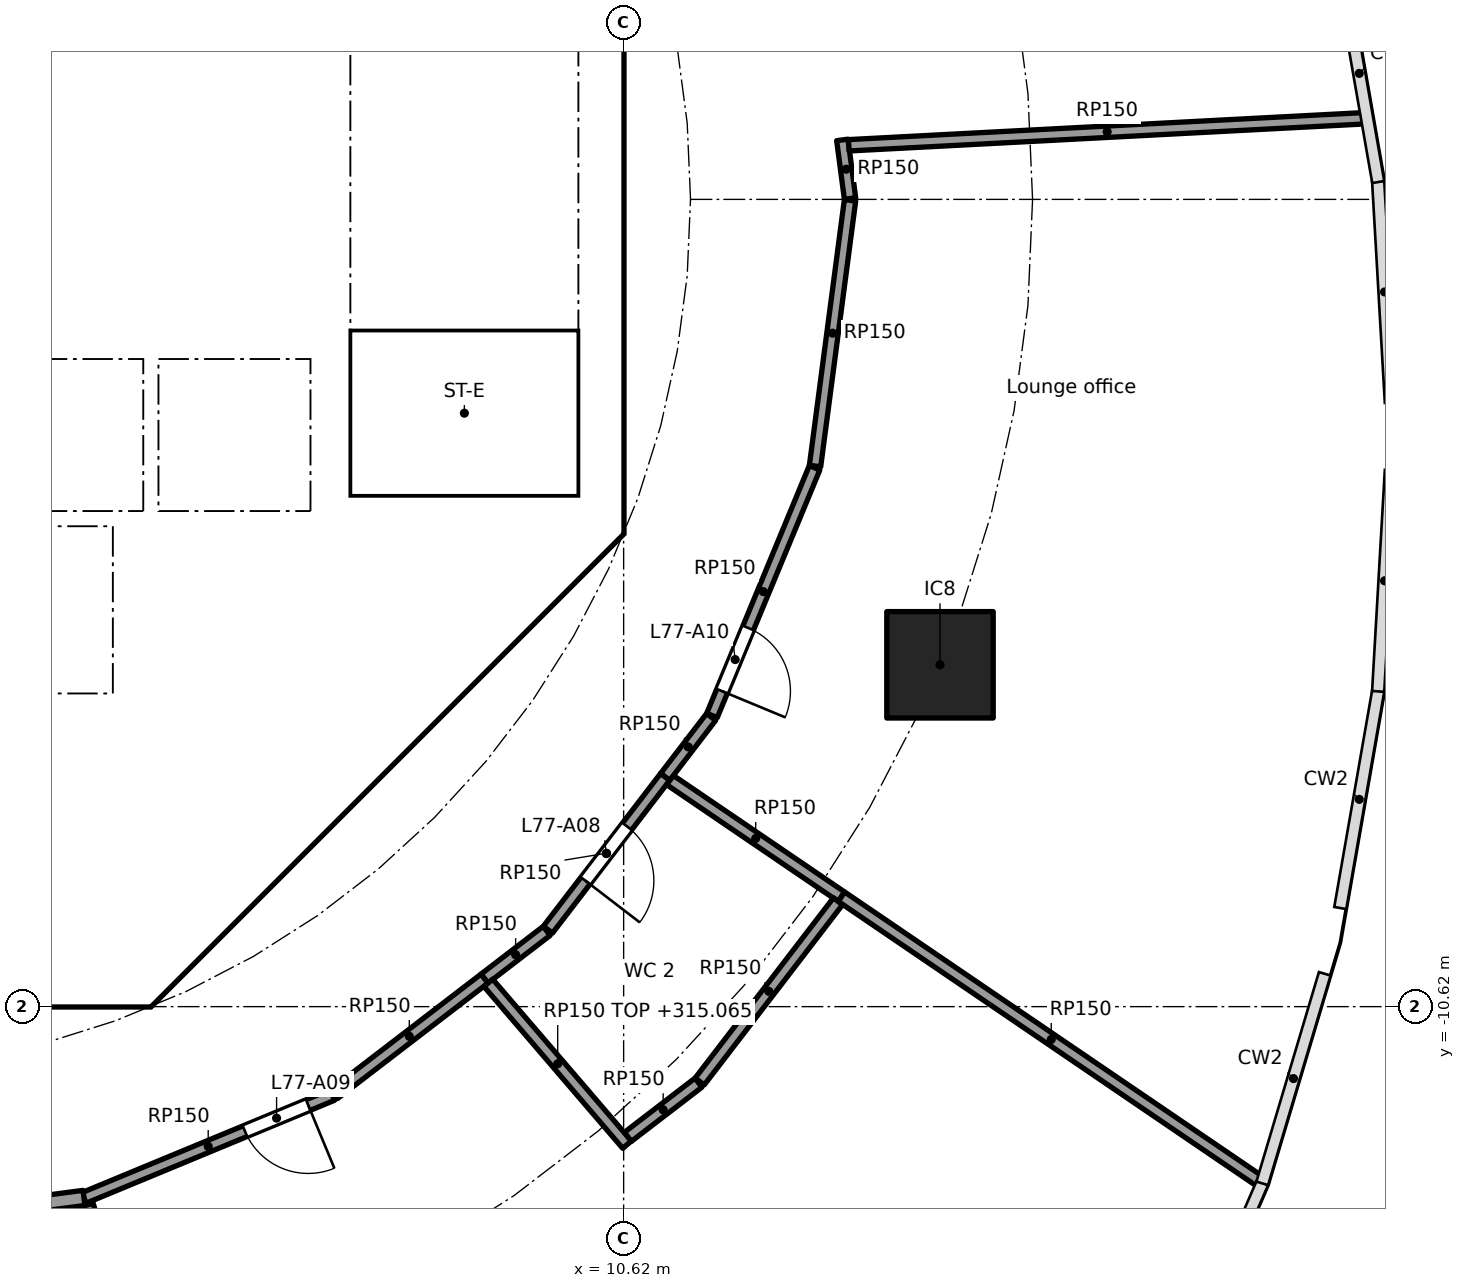
"""IFC4 building model, lengths in metres.
Left out: names, types, materials, properties, quantities, classifications, styles, units other than length and angle.
Written with IfcOpenShell. Run it as: python <this file> out.ifc"""

import sys

from ifc_helpers import new_model, si_unit, direction, frame, frame_2d, origin, origin_2d, place, context, subcontext, project, spatial, polyline, rectangle, outline, extrude, element, fill, save


model = new_model("IFC4")
c1 = context("Model", 3, precision=1e-05, world=origin(), true_north=direction((0.0, 1.0)))
c2 = subcontext(c1, "Body", "Model", "MODEL_VIEW")
j1 = project(units=[si_unit("LENGTHUNIT", "METRE"), si_unit("PLANEANGLEUNIT", "RADIAN")], contexts=[c1])
p1 = place(None, origin())
s1 = spatial("IfcSite", under=j1, at=p1, CompositionType="ELEMENT")
p2 = place(p1, origin())
s2 = spatial("IfcBuilding", under=s1, at=p2, CompositionType="ELEMENT")
p3 = place(p2, frame((0.0, 0.0, 310.3)))
s3 = spatial("IfcBuildingStorey", under=s2, at=p3, CompositionType="ELEMENT", Elevation=310.3)
p4 = place(p3, frame((14.782, -6.123, 0.0), z_axis=(0.0, 0.0, 1.0), x_axis=(1.0, 0.0, 0.0)))
e1 = element("IfcColumn", 1, at=p4, inside=s3, PredefinedType="COLUMN", context=c2, shape_type="SweptSolid", body=[
    extrude(rectangle(XDim=1.4, YDim=1.4, at=origin_2d()), origin(), (0.0, 0.0, 1.0), 5.6),
])
p5 = place(p3, frame((4.613, -9.988, 0.0), z_axis=(0.0, 0.0, 1.0), x_axis=(0.707106781187, 0.707106781187, 0.0)))
e2 = element("IfcWall", 2, at=p5, inside=s3, PredefinedType="SHEAR", context=c2, shape_type="SweptSolid", body=[
    extrude(rectangle(XDim=7.602, YDim=0.6, at=frame_2d((3.801, 0.0))), origin(), (0.0, 0.0, 1.0), 5.3),
])
p6 = place(p5, frame((3.201, 0.0, 0.0)))
e3 = element("IfcOpeningElement", 3, at=p6, cuts=e2, PredefinedType="OPENING", context=c2, shape_type="SweptSolid", body=[
    extrude(rectangle(XDim=1.2, YDim=2.1, at=frame_2d((0.6, 1.05))), frame((0.0, 0.31, 0.0), z_axis=(0.0, -1.0, 0.0), x_axis=(1.0, 0.0, 0.0)), (0.0, 0.0, 1.0), 0.62),
])
p7 = place(p3, frame((-6.7, 2.0, 0.0), z_axis=(0.0, 0.0, 1.0), x_axis=(1.0, 0.0, 0.0)))
e4 = element("IfcWall", 4, at=p7, inside=s3, PredefinedType="SOLIDWALL", context=c2, shape_type="SweptSolid", body=[
    extrude(rectangle(XDim=13.4, YDim=0.2, at=frame_2d((6.7, 0.0))), origin(), (0.0, 0.0, 1.0), 5.3),
])
p8 = place(p7, frame((11.65, 0.0, 0.0)))
e5 = element("IfcOpeningElement", 5, at=p8, cuts=e4, PredefinedType="OPENING", context=c2, shape_type="SweptSolid", body=[
    extrude(rectangle(XDim=1.1, YDim=2.1, at=frame_2d((0.55, 1.05))), frame((0.0, 0.11, 0.0), z_axis=(0.0, -1.0, 0.0), x_axis=(1.0, 0.0, 0.0)), (0.0, 0.0, 1.0), 0.22),
])
p9 = place(p7, frame((0.75, 0.0, 0.0)))
e6 = element("IfcOpeningElement", 6, at=p9, cuts=e4, PredefinedType="OPENING", context=c2, shape_type="SweptSolid", body=[
    extrude(rectangle(XDim=0.9, YDim=2.1, at=frame_2d((0.45, 1.05))), frame((0.0, 0.11, 0.0), z_axis=(0.0, -1.0, 0.0), x_axis=(1.0, 0.0, 0.0)), (0.0, 0.0, 1.0), 0.22),
])
p10 = place(p7, frame((4.05, 0.0, 0.0)))
e7 = element("IfcOpeningElement", 7, at=p10, cuts=e4, PredefinedType="OPENING", context=c2, shape_type="SweptSolid", body=[
    extrude(rectangle(XDim=0.9, YDim=2.1, at=frame_2d((0.45, 1.05))), frame((0.0, 0.11, 0.0), z_axis=(0.0, -1.0, 0.0), x_axis=(1.0, 0.0, 0.0)), (0.0, 0.0, 1.0), 0.22),
])
p11 = place(p7, frame((7.35, 0.0, 0.0)))
e8 = element("IfcOpeningElement", 8, at=p11, cuts=e4, PredefinedType="OPENING", context=c2, shape_type="SweptSolid", body=[
    extrude(rectangle(XDim=0.9, YDim=2.1, at=frame_2d((0.45, 1.05))), frame((0.0, 0.11, 0.0), z_axis=(0.0, -1.0, 0.0), x_axis=(1.0, 0.0, 0.0)), (0.0, 0.0, 1.0), 0.22),
])
p12 = place(p7, frame((9.55, 0.0, 0.0)))
e9 = element("IfcOpeningElement", 9, at=p12, cuts=e4, PredefinedType="OPENING", context=c2, shape_type="SweptSolid", body=[
    extrude(rectangle(XDim=0.9, YDim=2.1, at=frame_2d((0.45, 1.05))), frame((0.0, 0.11, 0.0), z_axis=(0.0, -1.0, 0.0), x_axis=(1.0, 0.0, 0.0)), (0.0, 0.0, 1.0), 0.22),
])
p13 = place(p3, frame((4.0, -10.025, 0.0), z_axis=(0.0, 0.0, 1.0), x_axis=(0.0, 1.0, 0.0)))
e10 = element("IfcWall", 10, at=p13, inside=s3, PredefinedType="SOLIDWALL", context=c2, shape_type="SweptSolid", body=[
    extrude(rectangle(XDim=3.0, YDim=0.2, at=frame_2d((1.5, 0.0))), origin(), (0.0, 0.0, 1.0), 5.3),
])
p14 = place(p13, frame((0.975, 0.0, 0.0)))
e11 = element("IfcOpeningElement", 11, at=p14, cuts=e10, PredefinedType="OPENING", context=c2, shape_type="SweptSolid", body=[
    extrude(rectangle(XDim=1.1, YDim=2.1, at=frame_2d((0.55, 1.05))), frame((0.0, 0.11, 0.0), z_axis=(0.0, -1.0, 0.0), x_axis=(1.0, 0.0, 0.0)), (0.0, 0.0, 1.0), 0.22),
])
p15 = place(p3, frame((4.0, -6.5, 0.0), z_axis=(0.0, 0.0, 1.0), x_axis=(0.0, 1.0, 0.0)))
e12 = element("IfcWall", 12, at=p15, inside=s3, PredefinedType="SOLIDWALL", context=c2, shape_type="SweptSolid", body=[
    extrude(rectangle(XDim=2.2, YDim=0.2, at=frame_2d((1.1, 0.0))), origin(), (0.0, 0.0, 1.0), 5.3),
])
p16 = place(p15, frame((0.55, 0.0, 0.0)))
e13 = element("IfcOpeningElement", 13, at=p16, cuts=e12, PredefinedType="OPENING", context=c2, shape_type="SweptSolid", body=[
    extrude(rectangle(XDim=1.1, YDim=2.1, at=frame_2d((0.55, 1.05))), frame((0.0, 0.11, 0.0), z_axis=(0.0, -1.0, 0.0), x_axis=(1.0, 0.0, 0.0)), (0.0, 0.0, 1.0), 0.22),
])
p17 = place(p3, frame((-6.7, -2.0, 0.0), z_axis=(0.0, 0.0, 1.0), x_axis=(1.0, 0.0, 0.0)))
e14 = element("IfcWall", 14, at=p17, inside=s3, PredefinedType="SOLIDWALL", context=c2, shape_type="SweptSolid", body=[
    extrude(rectangle(XDim=13.4, YDim=0.2, at=frame_2d((6.7, 0.0))), origin(), (0.0, 0.0, 1.0), 5.3),
])
p18 = place(p17, frame((9.45, 0.0, 0.0)))
e15 = element("IfcOpeningElement", 15, at=p18, cuts=e14, PredefinedType="OPENING", context=c2, shape_type="SweptSolid", body=[
    extrude(rectangle(XDim=1.1, YDim=2.1, at=frame_2d((0.55, 1.05))), frame((0.0, 0.11, 0.0), z_axis=(0.0, -1.0, 0.0), x_axis=(1.0, 0.0, 0.0)), (0.0, 0.0, 1.0), 0.22),
])
p19 = place(p17, frame((11.65, 0.0, 0.0)))
e16 = element("IfcOpeningElement", 16, at=p19, cuts=e14, PredefinedType="OPENING", context=c2, shape_type="SweptSolid", body=[
    extrude(rectangle(XDim=1.1, YDim=2.1, at=frame_2d((0.55, 1.05))), frame((0.0, 0.11, 0.0), z_axis=(0.0, -1.0, 0.0), x_axis=(1.0, 0.0, 0.0)), (0.0, 0.0, 1.0), 0.22),
])
p20 = place(p17, frame((1.85, 0.0, 0.0)))
e17 = element("IfcOpeningElement", 17, at=p20, cuts=e14, PredefinedType="OPENING", context=c2, shape_type="SweptSolid", body=[
    extrude(rectangle(XDim=0.9, YDim=2.1, at=frame_2d((0.45, 1.05))), frame((0.0, 0.11, 0.0), z_axis=(0.0, -1.0, 0.0), x_axis=(1.0, 0.0, 0.0)), (0.0, 0.0, 1.0), 0.22),
])
p21 = place(p17, frame((6.25, 0.0, 0.0)))
e18 = element("IfcOpeningElement", 18, at=p21, cuts=e14, PredefinedType="OPENING", context=c2, shape_type="SweptSolid", body=[
    extrude(rectangle(XDim=0.9, YDim=2.1, at=frame_2d((0.45, 1.05))), frame((0.0, 0.11, 0.0), z_axis=(0.0, -1.0, 0.0), x_axis=(1.0, 0.0, 0.0)), (0.0, 0.0, 1.0), 0.22),
])
p22 = place(p3, origin())
e19 = element("IfcWall", 19, at=p22, inside=s3, PredefinedType="SHEAR", context=c2, shape_type="SweptSolid", body=[
    extrude(outline(polyline([(-4.152, -10.025), (4.152, -10.025), (4.401, -9.776), (4.825, -10.2), (4.401, -10.625), (-4.401, -10.625), (-4.825, -10.2), (-4.401, -9.776), (-4.152, -10.025)])), origin(), (0.0, 0.0, 1.0), 5.3),
])
p23 = place(p3, origin())
e20 = element("IfcWall", 20, at=p23, inside=s3, PredefinedType="SHEAR", context=c2, shape_type="SweptSolid", body=[
    extrude(outline(polyline([(9.776, -4.401), (10.025, -4.152), (10.025, -3.801), (10.025, 4.152), (9.776, 4.401), (10.2, 4.825), (10.625, 4.401), (10.625, -4.401), (10.2, -4.825), (9.776, -4.401)])), origin(), (0.0, 0.0, 1.0), 5.3),
])
p24 = place(p3, origin())
e21 = element("IfcWall", 21, at=p24, inside=s3, PredefinedType="SOLIDWALL", context=c2, shape_type="SweptSolid", body=[
    extrude(outline(polyline([(-6.7, -2.1), (-6.5, -2.1), (-6.5, -4.1), (-2.3, -4.1), (-2.3, -2.1), (-2.1, -2.1), (-2.1, -4.1), (2.1, -4.1), (2.1, -2.1), (2.3, -2.1), (2.3, -4.1), (4.3, -4.1), (4.3, -2.1), (4.5, -2.1), (4.5, -4.1), (6.5, -4.1), (6.5, -2.1), (6.7, -2.1), (6.7, -4.3), (-6.7, -4.3), (-6.7, -2.1)])), origin(), (0.0, 0.0, 1.0), 5.3),
])
p25 = place(p3, origin())
e22 = element("IfcWall", 22, at=p25, inside=s3, PredefinedType="SOLIDWALL", context=c2, shape_type="SweptSolid", body=[
    extrude(outline(polyline([(4.1, -7.025), (-4.1, -7.025), (-4.1, -6.5), (4.1, -6.5), (4.1, -7.025)])), origin(), (0.0, 0.0, 1.0), 5.3),
])
p26 = place(p3, origin())
e23 = element("IfcWall", 23, at=p26, inside=s3, PredefinedType="SOLIDWALL", context=c2, shape_type="SweptSolid", body=[
    extrude(outline(polyline([(7.025, -3.9), (6.7, -3.9), (6.7, 3.9), (7.025, 3.9), (7.025, -3.9)])), origin(), (0.0, 0.0, 1.0), 5.3),
])
p27 = place(p3, origin())
e24 = element("IfcWall", 24, at=p27, inside=s3, PredefinedType="SOLIDWALL", context=c2, shape_type="SweptSolid", body=[
    extrude(outline(polyline([(10.025, -4.1), (6.7, -4.1), (6.7, -3.9), (10.025, -3.9), (10.025, -4.1)])), origin(), (0.0, 0.0, 1.0), 5.3),
])
p28 = place(p3, frame((6.789, -11.782, 0.0), z_axis=(0.0, 0.0, 1.0), x_axis=(-0.923862934009, -0.382723502237, 0.0)))
e25 = element("IfcWall", 25, at=p28, inside=s3, PredefinedType="PARTITIONING", context=c2, shape_type="SweptSolid", body=[
    extrude(rectangle(XDim=3.538, YDim=0.15, at=frame_2d((1.769, 0.0))), origin(), (0.0, 0.0, 1.0), 5.3),
])
p29 = place(p28, frame((0.346, 0.0, 0.0)))
e26 = element("IfcOpeningElement", 26, at=p29, cuts=e25, PredefinedType="OPENING", context=c2, shape_type="SweptSolid", body=[
    extrude(rectangle(XDim=0.9, YDim=2.1, at=frame_2d((0.45, 1.05))), frame((0.0, 0.085, 0.0), z_axis=(0.0, -1.0, 0.0), x_axis=(1.0, 0.0, 0.0)), (0.0, 0.0, 1.0), 0.17),
])
p30 = place(p3, frame((8.791, -10.25, 0.0), z_axis=(0.0, 0.0, 1.0), x_axis=(-0.7933828864, -0.608722921835, 0.0)))
e27 = element("IfcWall", 27, at=p30, inside=s3, PredefinedType="PARTITIONING", context=c2, shape_type="SweptSolid", body=[
    extrude(rectangle(XDim=2.498, YDim=0.15, at=frame_2d((1.249, 0.0))), origin(), (0.0, 0.0, 1.0), 5.3),
])
p31 = place(p3, frame((9.607, -9.624, 0.0), z_axis=(0.0, 0.0, 1.0), x_axis=(-0.793346631306, -0.608770172228, 0.0)))
e28 = element("IfcWall", 28, at=p31, inside=s3, PredefinedType="PARTITIONING", context=c2, shape_type="SweptSolid", body=[
    extrude(rectangle(XDim=1.029, YDim=0.15, at=frame_2d((0.515, 0.0))), origin(), (0.0, 0.0, 1.0), 5.3),
])
p32 = place(p3, frame((10.665, -12.436, 0.0), z_axis=(0.0, 0.0, 1.0), x_axis=(-0.651063790324, 0.759023017391, 0.0)))
e29 = element("IfcWall", 29, at=p32, inside=s3, PredefinedType="PARTITIONING", context=c2, shape_type="SweptSolid", body=[
    extrude(rectangle(XDim=2.804, YDim=0.15, at=frame_2d((1.402, 0.0))), origin(), (0.0, 0.0, 1.0), 4.765),
])
p33 = place(p3, frame((11.167, -7.596, 0.0), z_axis=(0.0, 0.0, 1.0), x_axis=(-0.60871867817, -0.793386142334, 0.0)))
e30 = element("IfcWall", 30, at=p33, inside=s3, PredefinedType="PARTITIONING", context=c2, shape_type="SweptSolid", body=[
    extrude(rectangle(XDim=2.534, YDim=0.15, at=frame_2d((1.267, 0.0))), origin(), (0.0, 0.0, 1.0), 5.3),
])
p34 = place(p33, frame((0.823, 0.0, 0.0)))
e31 = element("IfcOpeningElement", 31, at=p34, cuts=e30, PredefinedType="OPENING", context=c2, shape_type="SweptSolid", body=[
    extrude(rectangle(XDim=0.9, YDim=2.1, at=frame_2d((0.45, 1.05))), frame((0.0, 0.085, 0.0), z_axis=(0.0, -1.0, 0.0), x_axis=(1.0, 0.0, 0.0)), (0.0, 0.0, 1.0), 0.17),
])
p35 = place(p3, frame((11.229, -7.639, 0.0), z_axis=(0.0, 0.0, 1.0), x_axis=(0.826811683889, -0.56247883461, 0.0)))
e32 = element("IfcWall", 32, at=p35, inside=s3, PredefinedType="PARTITIONING", context=c2, shape_type="SweptSolid", body=[
    extrude(rectangle(XDim=2.729, YDim=0.15, at=frame_2d((1.365, 0.0))), origin(), (0.0, 0.0, 1.0), 5.3),
])
p36 = place(p3, frame((11.604, -11.621, 0.0), z_axis=(0.0, 0.0, 1.0), x_axis=(-0.793367902565, -0.608742450614, 0.0)))
e33 = element("IfcWall", 33, at=p36, inside=s3, PredefinedType="PARTITIONING", context=c2, shape_type="SweptSolid", body=[
    extrude(rectangle(XDim=1.17, YDim=0.15, at=frame_2d((0.585, 0.0))), origin(), (0.0, 0.0, 1.0), 5.3),
])
p37 = place(p3, frame((11.771, -6.809, 0.0), z_axis=(0.0, 0.0, 1.0), x_axis=(-0.608782769852, -0.793336964431, 0.0)))
e34 = element("IfcWall", 34, at=p37, inside=s3, PredefinedType="PARTITIONING", context=c2, shape_type="SweptSolid", body=[
    extrude(rectangle(XDim=0.992, YDim=0.15, at=frame_2d((0.496, 0.0))), origin(), (0.0, 0.0, 1.0), 5.3),
])
p38 = place(p3, frame((13.132, -3.531, 0.0), z_axis=(0.0, 0.0, 1.0), x_axis=(-0.382677866108, -0.923881838111, 0.0)))
e35 = element("IfcWall", 35, at=p38, inside=s3, PredefinedType="PARTITIONING", context=c2, shape_type="SweptSolid", body=[
    extrude(rectangle(XDim=3.527, YDim=0.15, at=frame_2d((1.763, 0.0))), origin(), (0.0, 0.0, 1.0), 5.3),
])
p39 = place(p38, frame((2.281, 0.0, 0.0)))
e36 = element("IfcOpeningElement", 36, at=p39, cuts=e35, PredefinedType="OPENING", context=c2, shape_type="SweptSolid", body=[
    extrude(rectangle(XDim=0.9, YDim=2.1, at=frame_2d((0.45, 1.05))), frame((0.0, 0.085, 0.0), z_axis=(0.0, -1.0, 0.0), x_axis=(1.0, 0.0, 0.0)), (0.0, 0.0, 1.0), 0.17),
])
p40 = place(p3, frame((13.44, -9.233, 0.0), z_axis=(0.0, 0.0, 1.0), x_axis=(-0.60873508117, -0.793373557004, 0.0)))
e37 = element("IfcWall", 37, at=p40, inside=s3, PredefinedType="PARTITIONING", context=c2, shape_type="SweptSolid", body=[
    extrude(rectangle(XDim=2.988, YDim=0.15, at=frame_2d((1.494, 0.0))), origin(), (0.0, 0.0, 1.0), 5.3),
])
p41 = place(p3, frame((13.486, -9.174, 0.0), z_axis=(0.0, 0.0, 1.0), x_axis=(0.826826499796, -0.562457055459, 0.0)))
e38 = element("IfcWall", 38, at=p41, inside=s3, PredefinedType="PARTITIONING", context=c2, shape_type="SweptSolid", body=[
    extrude(rectangle(XDim=6.676, YDim=0.15, at=frame_2d((3.338, 0.0))), origin(), (0.0, 0.0, 1.0), 5.3),
])
p42 = place(p3, frame((13.497, 0.782, 0.0), z_axis=(0.0, 0.0, 1.0), x_axis=(0.130332652421, -0.991470322154, 0.0)))
e39 = element("IfcWall", 39, at=p42, inside=s3, PredefinedType="PARTITIONING", context=c2, shape_type="SweptSolid", body=[
    extrude(rectangle(XDim=0.777, YDim=0.15, at=frame_2d((0.389, 0.0))), origin(), (0.0, 0.0, 1.0), 5.3),
])
p43 = place(p3, frame((13.598, -0.012, 0.0), z_axis=(0.0, 0.0, 1.0), x_axis=(-0.130499283623, -0.991448403586, 0.0)))
e40 = element("IfcWall", 40, at=p43, inside=s3, PredefinedType="PARTITIONING", context=c2, shape_type="SweptSolid", body=[
    extrude(rectangle(XDim=3.527, YDim=0.15, at=frame_2d((1.763, 0.0))), origin(), (0.0, 0.0, 1.0), 5.3),
])
p44 = place(p3, frame((20.381, 1.068, 0.0), z_axis=(0.0, 0.0, 1.0), x_axis=(-0.998630283289, -0.052321671394, 0.0)))
e41 = element("IfcWall", 41, at=p44, inside=s3, PredefinedType="PARTITIONING", context=c2, shape_type="SweptSolid", body=[
    extrude(rectangle(XDim=6.808, YDim=0.15, at=frame_2d((3.404, 0.0))), origin(), (0.0, 0.0, 1.0), 5.3),
])
p45 = place(p3, frame((3.52, -13.137, 0.0), z_axis=(0.0, 0.0, 1.0), x_axis=(-0.991453825407, -0.130458085553, 0.0)))
e42 = element("IfcWall", 42, at=p45, inside=s3, PredefinedType="PARTITIONING", context=c2, shape_type="SweptSolid", body=[
    extrude(rectangle(XDim=3.535, YDim=0.2, at=frame_2d((1.768, 0.0))), origin(), (0.0, 0.0, 1.0), 5.3),
])
p46 = place(p45, frame((1.325, 0.0, 0.0)))
e43 = element("IfcOpeningElement", 43, at=p46, cuts=e42, PredefinedType="OPENING", context=c2, shape_type="SweptSolid", body=[
    extrude(rectangle(XDim=0.9, YDim=2.1, at=frame_2d((0.45, 1.05))), frame((0.0, 0.11, 0.0), z_axis=(0.0, -1.0, 0.0), x_axis=(1.0, 0.0, 0.0)), (0.0, 0.0, 1.0), 0.22),
])
p47 = place(p3, frame((7.135, -26.627, 0.0), z_axis=(0.0, 0.0, 1.0), x_axis=(-0.258828495285, 0.965923294071, 0.0)))
e44 = element("IfcWall", 44, at=p47, inside=s3, PredefinedType="PARTITIONING", context=c2, shape_type="SweptSolid", body=[
    extrude(rectangle(XDim=13.866, YDim=0.2, at=frame_2d((6.933, 0.0))), origin(), (0.0, 0.0, 1.0), 5.3),
])
p48 = place(p18, origin())
e45 = element("IfcDoor", 45, at=p48, inside=s3, OperationType="DOUBLE_DOOR_SLIDING", PredefinedType="DOOR", context=c2, shape_type="SweptSolid", body=[
    extrude(rectangle(XDim=1.1, YDim=2.1, at=frame_2d((0.55, 1.05))), frame((0.0, 0.025, 0.0), z_axis=(0.0, -1.0, 0.0), x_axis=(1.0, 0.0, 0.0)), (0.0, 0.0, 1.0), 0.05),
])
fill(e15, e45)
p49 = place(p19, origin())
e46 = element("IfcDoor", 46, at=p49, inside=s3, OperationType="DOUBLE_DOOR_SLIDING", PredefinedType="DOOR", context=c2, shape_type="SweptSolid", body=[
    extrude(rectangle(XDim=1.1, YDim=2.1, at=frame_2d((0.55, 1.05))), frame((0.0, 0.025, 0.0), z_axis=(0.0, -1.0, 0.0), x_axis=(1.0, 0.0, 0.0)), (0.0, 0.0, 1.0), 0.05),
])
fill(e16, e46)
p50 = place(p16, origin())
e47 = element("IfcDoor", 47, at=p50, inside=s3, OperationType="DOUBLE_DOOR_SLIDING", PredefinedType="DOOR", context=c2, shape_type="SweptSolid", body=[
    extrude(rectangle(XDim=1.1, YDim=2.1, at=frame_2d((0.55, 1.05))), frame((0.0, 0.025, 0.0), z_axis=(0.0, -1.0, 0.0), x_axis=(1.0, 0.0, 0.0)), (0.0, 0.0, 1.0), 0.05),
])
fill(e13, e47)
p51 = place(p14, origin())
e48 = element("IfcDoor", 48, at=p51, inside=s3, OperationType="SINGLE_SWING_RIGHT", PredefinedType="DOOR", context=c2, shape_type="SweptSolid", body=[
    extrude(rectangle(XDim=1.1, YDim=2.1, at=frame_2d((0.55, 1.05))), frame((0.0, 0.025, 0.0), z_axis=(0.0, -1.0, 0.0), x_axis=(1.0, 0.0, 0.0)), (0.0, 0.0, 1.0), 0.05),
])
fill(e11, e48)
p52 = place(p6, origin())
e49 = element("IfcDoor", 49, at=p52, inside=s3, OperationType="SINGLE_SWING_LEFT", PredefinedType="DOOR", context=c2, shape_type="SweptSolid", body=[
    extrude(rectangle(XDim=1.2, YDim=2.1, at=frame_2d((0.6, 1.05))), frame((0.0, 0.025, 0.0), z_axis=(0.0, -1.0, 0.0), x_axis=(1.0, 0.0, 0.0)), (0.0, 0.0, 1.0), 0.05),
])
fill(e3, e49)
p53 = place(p34, origin())
e50 = element("IfcDoor", 50, at=p53, inside=s3, OperationType="SINGLE_SWING_RIGHT", PredefinedType="DOOR", context=c2, shape_type="SweptSolid", body=[
    extrude(rectangle(XDim=0.9, YDim=2.1, at=frame_2d((0.45, 1.05))), frame((0.0, 0.025, 0.0), z_axis=(0.0, -1.0, 0.0), x_axis=(1.0, 0.0, 0.0)), (0.0, 0.0, 1.0), 0.05),
])
fill(e31, e50)
p54 = place(p29, origin())
e51 = element("IfcDoor", 51, at=p54, inside=s3, OperationType="SINGLE_SWING_LEFT", PredefinedType="DOOR", context=c2, shape_type="SweptSolid", body=[
    extrude(rectangle(XDim=0.9, YDim=2.1, at=frame_2d((0.45, 1.05))), frame((0.0, 0.025, 0.0), z_axis=(0.0, -1.0, 0.0), x_axis=(1.0, 0.0, 0.0)), (0.0, 0.0, 1.0), 0.05),
])
fill(e26, e51)
p55 = place(p39, origin())
e52 = element("IfcDoor", 52, at=p55, inside=s3, OperationType="SINGLE_SWING_RIGHT", PredefinedType="DOOR", context=c2, shape_type="SweptSolid", body=[
    extrude(rectangle(XDim=0.9, YDim=2.1, at=frame_2d((0.45, 1.05))), frame((0.0, 0.025, 0.0), z_axis=(0.0, -1.0, 0.0), x_axis=(1.0, 0.0, 0.0)), (0.0, 0.0, 1.0), 0.05),
])
fill(e36, e52)
save(model, sys.argv[1])
